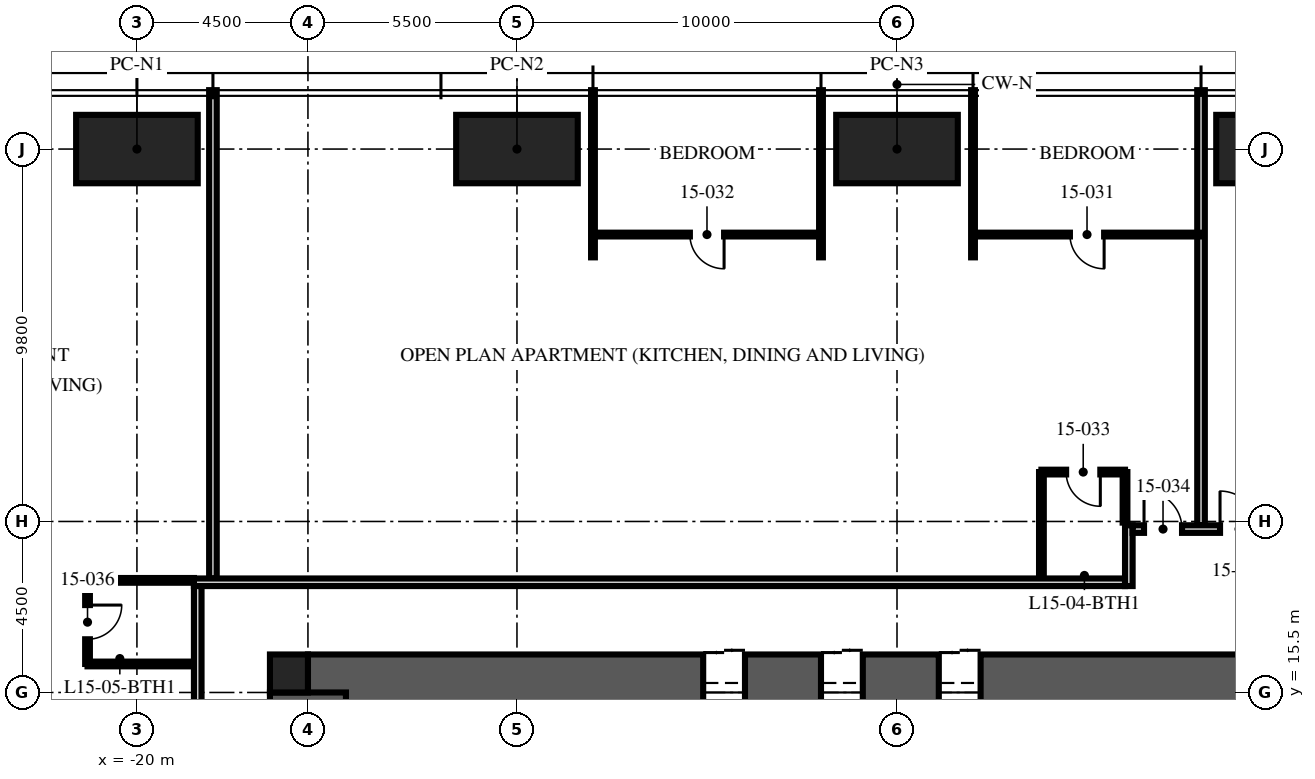
"""IFC4 building model, lengths in metres.
Left out: names, types, materials, properties, quantities, classifications, styles, units other than length and angle.
Written with IfcOpenShell. Run it as: python <this file> out.ifc"""

import sys

from ifc_helpers import new_model, si_unit, direction, frame, frame_2d, origin, origin_2d, place, context, subcontext, project, spatial, rectangle, hollow_rectangle, extrude, element, fill, save


model = new_model("IFC4")
c1 = context("Model", 3, precision=1e-05, world=origin(), true_north=direction((0.0, 1.0)))
c2 = subcontext(c1, "Body", "Model", "MODEL_VIEW")
j1 = project(units=[si_unit("LENGTHUNIT", "METRE"), si_unit("PLANEANGLEUNIT", "RADIAN")], contexts=[c1])
p1 = place(None, origin())
s1 = spatial("IfcSite", under=j1, at=p1, CompositionType="ELEMENT")
p2 = place(p1, origin())
s2 = spatial("IfcBuilding", under=s1, at=p2, CompositionType="ELEMENT")
p3 = place(p2, frame((0.0, 0.0, 62.25)))
s3 = spatial("IfcBuildingStorey", under=s2, at=p3, CompositionType="ELEMENT", Elevation=62.25)
p4 = place(p3, frame((-15.5, 15.5, -0.25), z_axis=(0.0, 0.0, 1.0), x_axis=(1.0, 0.0, 0.0)))
e1 = element("IfcWall", 1, at=p4, inside=s3, PredefinedType="SHEAR", context=c2, shape_type="SweptSolid", body=[
    extrude(rectangle(XDim=31.0, YDim=2.0, at=frame_2d((15.5, 0.0))), origin(), (0.0, 0.0, 1.0), 3.75),
])
p5 = place(p4, frame((10.4, 0.0, 0.25)))
e2 = element("IfcOpeningElement", 2, at=p5, cuts=e1, PredefinedType="OPENING", context=c2, shape_type="SweptSolid", body=[
    extrude(rectangle(XDim=1.1, YDim=2.1, at=frame_2d((0.55, 1.05))), frame((0.0, 1.01, 0.0), z_axis=(0.0, -1.0, 0.0), x_axis=(1.0, 0.0, 0.0)), (0.0, 0.0, 1.0), 2.02),
])
p6 = place(p4, frame((13.5, 0.0, 0.25)))
e3 = element("IfcOpeningElement", 3, at=p6, cuts=e1, PredefinedType="OPENING", context=c2, shape_type="SweptSolid", body=[
    extrude(rectangle(XDim=1.1, YDim=2.1, at=frame_2d((0.55, 1.05))), frame((0.0, 1.01, 0.0), z_axis=(0.0, -1.0, 0.0), x_axis=(1.0, 0.0, 0.0)), (0.0, 0.0, 1.0), 2.02),
])
p7 = place(p4, frame((16.6, 0.0, 0.25)))
e4 = element("IfcOpeningElement", 4, at=p7, cuts=e1, PredefinedType="OPENING", context=c2, shape_type="SweptSolid", body=[
    extrude(rectangle(XDim=1.1, YDim=2.1, at=frame_2d((0.55, 1.05))), frame((0.0, 1.01, 0.0), z_axis=(0.0, -1.0, 0.0), x_axis=(1.0, 0.0, 0.0)), (0.0, 0.0, 1.0), 2.02),
])
p8 = place(p3, frame((-15.5, -15.5, -0.25), z_axis=(0.0, 0.0, 1.0), x_axis=(0.0, 1.0, 0.0)))
e5 = element("IfcWall", 5, at=p8, inside=s3, PredefinedType="SHEAR", context=c2, shape_type="SweptSolid", body=[
    extrude(rectangle(XDim=31.0, YDim=2.0, at=frame_2d((15.5, 0.0))), origin(), (0.0, 0.0, 1.0), 3.75),
])
p9 = place(p8, frame((6.5, 0.0, 0.25)))
e6 = element("IfcOpeningElement", 6, at=p9, cuts=e5, PredefinedType="OPENING", context=c2, shape_type="SweptSolid", body=[
    extrude(rectangle(XDim=1.2, YDim=2.1, at=frame_2d((0.6, 1.05))), frame((0.0, 1.01, 0.0), z_axis=(0.0, -1.0, 0.0), x_axis=(1.0, 0.0, 0.0)), (0.0, 0.0, 1.0), 2.02),
])
p10 = place(p8, frame((23.0, 0.0, 0.25)))
e7 = element("IfcOpeningElement", 7, at=p10, cuts=e5, PredefinedType="OPENING", context=c2, shape_type="SweptSolid", body=[
    extrude(rectangle(XDim=1.8, YDim=2.1, at=frame_2d((0.9, 1.05))), frame((0.0, 1.01, 0.0), z_axis=(0.0, -1.0, 0.0), x_axis=(1.0, 0.0, 0.0)), (0.0, 0.0, 1.0), 2.02),
])
p11 = place(p3, frame((-16.0, 16.0, -0.25), z_axis=(0.0, 0.0, 1.0), x_axis=(1.0, 0.0, 0.0)))
e8 = element("IfcColumn", 8, at=p11, inside=s3, PredefinedType="COLUMN", context=c2, shape_type="SweptSolid", body=[
    extrude(rectangle(XDim=1.0, YDim=1.0, at=origin_2d()), origin(), (0.0, 0.0, 1.0), 3.75),
])
for number, where, z_axis, x_axis in (
    (9, (-20.0, 29.8, 0.0), (0.0, 0.0, 1.0), (1.0, 0.0, 0.0)),
    (10, (-10.0, 29.8, 0.0), (0.0, 0.0, 1.0), (1.0, 0.0, 0.0)),
    (11, (0.0, 29.8, 0.0), (0.0, 0.0, 1.0), (1.0, 0.0, 0.0)),
    (12, (10.0, 29.8, 0.0), (0.0, 0.0, 1.0), (1.0, 0.0, 0.0)),
):
    element("IfcColumn", number, at=place(p3, frame(where, z_axis=z_axis, x_axis=x_axis)), inside=s3, PredefinedType="COLUMN", context=c2, shape_type="SweptSolid", body=[
        extrude(hollow_rectangle(XDim=3.2, YDim=1.8, WallThickness=0.2, at=origin_2d()), origin(), (0.0, 0.0, 1.0), 3.75),
    ])
p12 = place(p3, frame((8.0, 19.9, 0.0), z_axis=(0.0, 0.0, 1.0), x_axis=(0.0, 1.0, 0.0)))
e13 = element("IfcWall", 13, at=p12, inside=s3, PredefinedType="PARTITIONING", context=c2, shape_type="SweptSolid", body=[
    extrude(rectangle(XDim=11.45, YDim=0.2, at=frame_2d((5.725, 0.0))), origin(), (0.0, 0.0, 1.0), 2.71),
])
for number, where, z_axis, x_axis in (
    (14, (2.0, 26.95, 0.0), (0.0, 0.0, 1.0), (0.0, 1.0, 0.0)),
    (15, (-2.0, 26.95, 0.0), (0.0, 0.0, 1.0), (0.0, 1.0, 0.0)),
    (16, (-8.0, 26.95, 0.0), (0.0, 0.0, 1.0), (0.0, 1.0, 0.0)),
):
    element("IfcWall", number, at=place(p3, frame(where, z_axis=z_axis, x_axis=x_axis)), inside=s3, PredefinedType="PARTITIONING", context=c2, shape_type="SweptSolid", body=[
        extrude(rectangle(XDim=4.4, YDim=0.1, at=frame_2d((2.2, 0.0))), origin(), (0.0, 0.0, 1.0), 2.71),
    ])
p13 = place(p3, frame((-18.0, 18.5, 0.0), z_axis=(0.0, 0.0, 1.0), x_axis=(0.0, 1.0, 0.0)))
e17 = element("IfcWall", 17, at=p13, inside=s3, PredefinedType="PARTITIONING", context=c2, shape_type="SweptSolid", body=[
    extrude(rectangle(XDim=12.85, YDim=0.2, at=frame_2d((6.425, 0.0))), origin(), (0.0, 0.0, 1.0), 2.3),
])
p14 = place(p3, frame((8.0, 27.55, 0.0), z_axis=(0.0, 0.0, 1.0), x_axis=(-1.0, 0.0, 0.0)))
e18 = element("IfcWall", 18, at=p14, inside=s3, PredefinedType="PARTITIONING", context=c2, shape_type="SweptSolid", body=[
    extrude(rectangle(XDim=6.0, YDim=0.1, at=frame_2d((3.0, 0.0))), origin(), (0.0, 0.0, 1.0), 2.61),
])
p15 = place(p14, frame((2.55, 0.0, 0.0)))
e19 = element("IfcOpeningElement", 19, at=p15, cuts=e18, PredefinedType="OPENING", context=c2, shape_type="SweptSolid", body=[
    extrude(rectangle(XDim=0.9, YDim=2.1, at=frame_2d((0.45, 1.05))), frame((0.0, 0.06, 0.0), z_axis=(0.0, -1.0, 0.0), x_axis=(1.0, 0.0, 0.0)), (0.0, 0.0, 1.0), 0.12),
])
p16 = place(p3, frame((-2.0, 27.55, 0.0), z_axis=(0.0, 0.0, 1.0), x_axis=(-1.0, 0.0, 0.0)))
e20 = element("IfcWall", 20, at=p16, inside=s3, PredefinedType="PARTITIONING", context=c2, shape_type="SweptSolid", body=[
    extrude(rectangle(XDim=6.0, YDim=0.1, at=frame_2d((3.0, 0.0))), origin(), (0.0, 0.0, 1.0), 2.61),
])
p17 = place(p16, frame((2.55, 0.0, 0.0)))
e21 = element("IfcOpeningElement", 21, at=p17, cuts=e20, PredefinedType="OPENING", context=c2, shape_type="SweptSolid", body=[
    extrude(rectangle(XDim=0.9, YDim=2.1, at=frame_2d((0.45, 1.05))), frame((0.0, 0.06, 0.0), z_axis=(0.0, -1.0, 0.0), x_axis=(1.0, 0.0, 0.0)), (0.0, 0.0, 1.0), 0.12),
])
p18 = place(p3, frame((6.0, 21.3, 0.0), z_axis=(0.0, 0.0, 1.0), x_axis=(-1.0, 0.0, 0.0)))
e22 = element("IfcWall", 22, at=p18, inside=s3, PredefinedType="PARTITIONING", context=c2, shape_type="SweptSolid", body=[
    extrude(rectangle(XDim=2.2, YDim=0.125, at=frame_2d((1.1, 0.0))), origin(), (0.0, 0.0, 1.0), 2.61),
])
p19 = place(p18, frame((0.65, 0.0, 0.0)))
e23 = element("IfcOpeningElement", 23, at=p19, cuts=e22, PredefinedType="OPENING", context=c2, shape_type="SweptSolid", body=[
    extrude(rectangle(XDim=0.9, YDim=2.1, at=frame_2d((0.45, 1.05))), frame((0.0, 0.073, 0.0), z_axis=(0.0, -1.0, 0.0), x_axis=(1.0, 0.0, 0.0)), (0.0, 0.0, 1.0), 0.145),
])
p20 = place(p3, frame((6.0, 19.97, 0.0), z_axis=(0.0, 0.0, 1.0), x_axis=(0.0, 1.0, 0.0)))
e24 = element("IfcWall", 24, at=p20, inside=s3, PredefinedType="PARTITIONING", context=c2, shape_type="SweptSolid", body=[
    extrude(rectangle(XDim=1.33, YDim=0.125, at=frame_2d((0.665, 0.0))), origin(), (0.0, 0.0, 1.0), 3.5),
])
p21 = place(p3, frame((3.8, 18.5, 0.0), z_axis=(0.0, 0.0, 1.0), x_axis=(0.0, 1.0, 0.0)))
e25 = element("IfcWall", 25, at=p21, inside=s3, PredefinedType="PARTITIONING", context=c2, shape_type="SweptSolid", body=[
    extrude(rectangle(XDim=2.8, YDim=0.125, at=frame_2d((1.4, 0.0))), origin(), (0.0, 0.0, 1.0), 3.5),
])
p22 = place(p3, frame((-21.3, 18.45, 0.0), z_axis=(0.0, 0.0, 1.0), x_axis=(0.0, -1.0, 0.0)))
e26 = element("IfcWall", 26, at=p22, inside=s3, PredefinedType="PARTITIONING", context=c2, shape_type="SweptSolid", body=[
    extrude(rectangle(XDim=2.2, YDim=0.125, at=frame_2d((1.1, 0.0))), origin(), (0.0, 0.0, 1.0), 3.5),
])
p23 = place(p22, frame((0.65, 0.0, 0.0)))
e27 = element("IfcOpeningElement", 27, at=p23, cuts=e26, PredefinedType="OPENING", context=c2, shape_type="SweptSolid", body=[
    extrude(rectangle(XDim=0.9, YDim=2.1, at=frame_2d((0.45, 1.05))), frame((0.0, 0.073, 0.0), z_axis=(0.0, -1.0, 0.0), x_axis=(1.0, 0.0, 0.0)), (0.0, 0.0, 1.0), 0.145),
])
p24 = place(p3, frame((-18.5, 18.45, 0.0), z_axis=(0.0, 0.0, 1.0), x_axis=(-1.0, 0.0, 0.0)))
e28 = element("IfcWall", 28, at=p24, inside=s3, PredefinedType="PARTITIONING", context=c2, shape_type="SweptSolid", body=[
    extrude(rectangle(XDim=2.8, YDim=0.125, at=frame_2d((1.4, 0.0))), origin(), (0.0, 0.0, 1.0), 2.3),
])
p25 = place(p3, frame((-18.5, 16.25, 0.0), z_axis=(0.0, 0.0, 1.0), x_axis=(-1.0, 0.0, 0.0)))
e29 = element("IfcWall", 29, at=p25, inside=s3, PredefinedType="PARTITIONING", context=c2, shape_type="SweptSolid", body=[
    extrude(rectangle(XDim=2.8, YDim=0.125, at=frame_2d((1.4, 0.0))), origin(), (0.0, 0.0, 1.0), 3.5),
])
p26 = place(p3, frame((-18.5, 18.4, 0.0), z_axis=(0.0, 0.0, 1.0), x_axis=(1.0, 0.0, 0.0)))
e30 = element("IfcWall", 30, at=p26, inside=s3, PredefinedType="PARTITIONING", context=c2, shape_type="SweptSolid", body=[
    extrude(rectangle(XDim=24.5, YDim=0.2, at=frame_2d((12.25, 0.0))), origin(), (0.0, 0.0, 1.0), 2.3),
])
p27 = place(p3, frame((6.1, 18.3, 0.0), z_axis=(0.0, 0.0, 1.0), x_axis=(0.0, 1.0, 0.0)))
e31 = element("IfcWall", 31, at=p27, inside=s3, PredefinedType="PARTITIONING", context=c2, shape_type="SweptSolid", body=[
    extrude(rectangle(XDim=1.6, YDim=0.2, at=frame_2d((0.8, 0.0))), origin(), (0.0, 0.0, 1.0), 3.5),
])
p28 = place(p3, frame((6.2, 19.8, 0.0), z_axis=(0.0, 0.0, 1.0), x_axis=(1.0, 0.0, 0.0)))
e32 = element("IfcWall", 32, at=p28, inside=s3, PredefinedType="PARTITIONING", context=c2, shape_type="SweptSolid", body=[
    extrude(rectangle(XDim=3.6, YDim=0.2, at=frame_2d((1.8, 0.0))), origin(), (0.0, 0.0, 1.0), 3.5),
])
p29 = place(p28, frame((2.3, 0.0, 0.0)))
e33 = element("IfcOpeningElement", 33, at=p29, cuts=e32, PredefinedType="OPENING", context=c2, shape_type="SweptSolid", body=[
    extrude(rectangle(XDim=1.0, YDim=2.2, at=frame_2d((0.5, 1.1))), frame((0.0, 0.11, 0.0), z_axis=(0.0, -1.0, 0.0), x_axis=(1.0, 0.0, 0.0)), (0.0, 0.0, 1.0), 0.22),
])
p30 = place(p28, frame((0.3, 0.0, 0.0)))
e34 = element("IfcOpeningElement", 34, at=p30, cuts=e32, PredefinedType="OPENING", context=c2, shape_type="SweptSolid", body=[
    extrude(rectangle(XDim=1.0, YDim=2.2, at=frame_2d((0.5, 1.1))), frame((0.0, 0.11, 0.0), z_axis=(0.0, -1.0, 0.0), x_axis=(1.0, 0.0, 0.0)), (0.0, 0.0, 1.0), 0.22),
])
p31 = place(p3, frame((-18.4, 18.3, 0.0), z_axis=(0.0, 0.0, 1.0), x_axis=(0.0, -1.0, 0.0)))
e35 = element("IfcWall", 35, at=p31, inside=s3, PredefinedType="PARTITIONING", context=c2, shape_type="SweptSolid", body=[
    extrude(rectangle(XDim=8.3, YDim=0.2, at=frame_2d((4.15, 0.0))), origin(), (0.0, 0.0, 1.0), 2.3),
])
p32 = place(p5, origin())
e36 = element("IfcDoor", 36, at=p32, inside=s3, OperationType="DOUBLE_DOOR_SLIDING", PredefinedType="DOOR", context=c2, shape_type="SweptSolid", body=[
    extrude(rectangle(XDim=1.1, YDim=2.1, at=frame_2d((0.55, 1.05))), frame((0.0, 0.025, 0.0), z_axis=(0.0, -1.0, 0.0), x_axis=(1.0, 0.0, 0.0)), (0.0, 0.0, 1.0), 0.05),
])
fill(e2, e36)
p33 = place(p6, origin())
e37 = element("IfcDoor", 37, at=p33, inside=s3, OperationType="DOUBLE_DOOR_SLIDING", PredefinedType="DOOR", context=c2, shape_type="SweptSolid", body=[
    extrude(rectangle(XDim=1.1, YDim=2.1, at=frame_2d((0.55, 1.05))), frame((0.0, 0.025, 0.0), z_axis=(0.0, -1.0, 0.0), x_axis=(1.0, 0.0, 0.0)), (0.0, 0.0, 1.0), 0.05),
])
fill(e3, e37)
p34 = place(p7, origin())
e38 = element("IfcDoor", 38, at=p34, inside=s3, OperationType="DOUBLE_DOOR_SLIDING", PredefinedType="DOOR", context=c2, shape_type="SweptSolid", body=[
    extrude(rectangle(XDim=1.1, YDim=2.1, at=frame_2d((0.55, 1.05))), frame((0.0, 0.025, 0.0), z_axis=(0.0, -1.0, 0.0), x_axis=(1.0, 0.0, 0.0)), (0.0, 0.0, 1.0), 0.05),
])
fill(e4, e38)
p35 = place(p29, origin())
e39 = element("IfcDoor", 39, at=p35, inside=s3, OperationType="SINGLE_SWING_LEFT", PredefinedType="DOOR", context=c2, shape_type="SweptSolid", body=[
    extrude(rectangle(XDim=1.0, YDim=2.2, at=frame_2d((0.5, 1.1))), frame((0.0, 0.025, 0.0), z_axis=(0.0, -1.0, 0.0), x_axis=(1.0, 0.0, 0.0)), (0.0, 0.0, 1.0), 0.05),
])
fill(e33, e39)
p36 = place(p15, origin())
e40 = element("IfcDoor", 40, at=p36, inside=s3, OperationType="SINGLE_SWING_LEFT", PredefinedType="DOOR", context=c2, shape_type="SweptSolid", body=[
    extrude(rectangle(XDim=0.9, YDim=2.1, at=frame_2d((0.45, 1.05))), frame((0.0, 0.025, 0.0), z_axis=(0.0, -1.0, 0.0), x_axis=(1.0, 0.0, 0.0)), (0.0, 0.0, 1.0), 0.05),
])
fill(e19, e40)
p37 = place(p17, origin())
e41 = element("IfcDoor", 41, at=p37, inside=s3, OperationType="SINGLE_SWING_LEFT", PredefinedType="DOOR", context=c2, shape_type="SweptSolid", body=[
    extrude(rectangle(XDim=0.9, YDim=2.1, at=frame_2d((0.45, 1.05))), frame((0.0, 0.025, 0.0), z_axis=(0.0, -1.0, 0.0), x_axis=(1.0, 0.0, 0.0)), (0.0, 0.0, 1.0), 0.05),
])
fill(e21, e41)
p38 = place(p19, origin())
e42 = element("IfcDoor", 42, at=p38, inside=s3, OperationType="SINGLE_SWING_LEFT", PredefinedType="DOOR", context=c2, shape_type="SweptSolid", body=[
    extrude(rectangle(XDim=0.9, YDim=2.1, at=frame_2d((0.45, 1.05))), frame((0.0, 0.025, 0.0), z_axis=(0.0, -1.0, 0.0), x_axis=(1.0, 0.0, 0.0)), (0.0, 0.0, 1.0), 0.05),
])
fill(e23, e42)
p39 = place(p30, origin())
e43 = element("IfcDoor", 43, at=p39, inside=s3, OperationType="SINGLE_SWING_LEFT", PredefinedType="DOOR", context=c2, shape_type="SweptSolid", body=[
    extrude(rectangle(XDim=1.0, YDim=2.2, at=frame_2d((0.5, 1.1))), frame((0.0, 0.025, 0.0), z_axis=(0.0, -1.0, 0.0), x_axis=(1.0, 0.0, 0.0)), (0.0, 0.0, 1.0), 0.05),
])
fill(e34, e43)
p40 = place(p23, origin())
e44 = element("IfcDoor", 44, at=p40, inside=s3, OperationType="SINGLE_SWING_LEFT", PredefinedType="DOOR", context=c2, shape_type="SweptSolid", body=[
    extrude(rectangle(XDim=0.9, YDim=2.1, at=frame_2d((0.45, 1.05))), frame((0.0, 0.025, 0.0), z_axis=(0.0, -1.0, 0.0), x_axis=(1.0, 0.0, 0.0)), (0.0, 0.0, 1.0), 0.05),
])
fill(e27, e44)
save(model, sys.argv[1])
